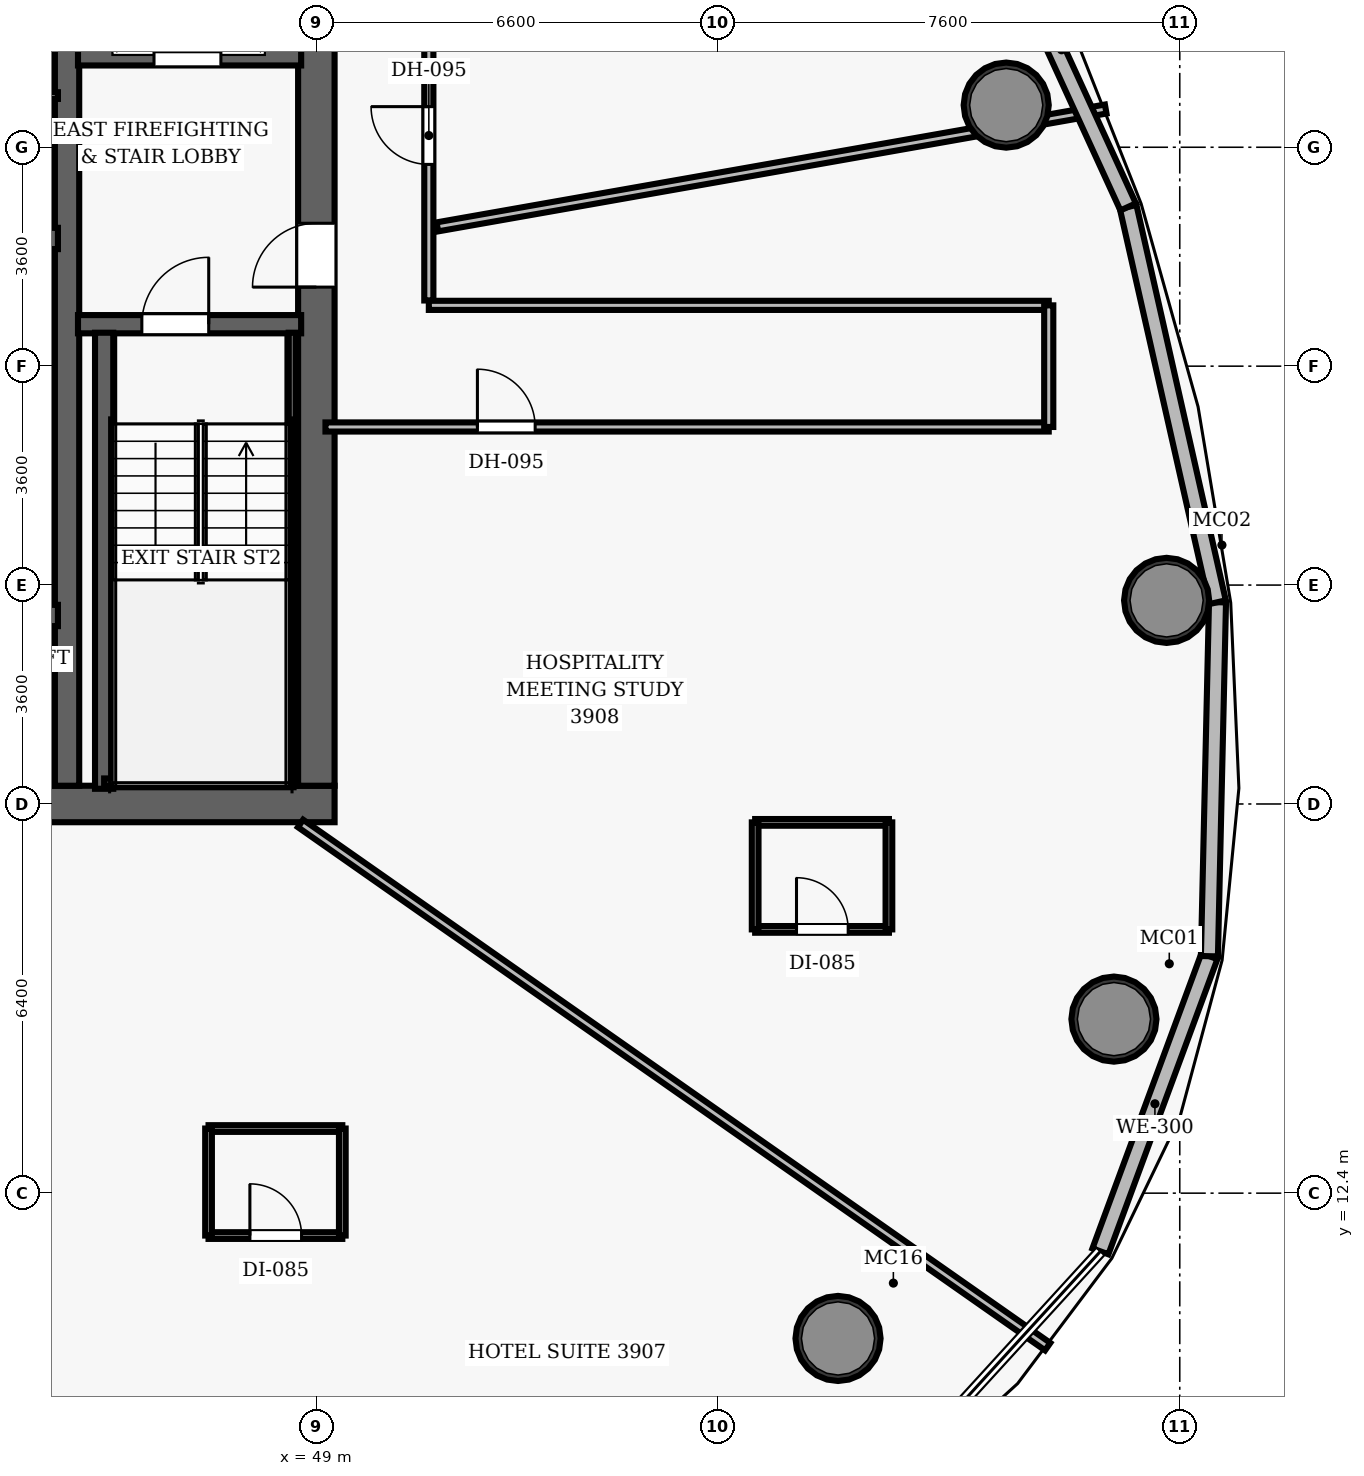
"""IFC4 building model, lengths in metres.
Left out: names, types, materials, properties, quantities, classifications, styles, units other than length and angle.
Written with IfcOpenShell. Run it as: python <this file> out.ifc"""

import sys

from ifc_helpers import new_model, si_unit, direction, frame, frame_2d, origin, origin_2d, place, context, subcontext, project, spatial, rectangle, hollow_circle, extrude, element, fill, save


model = new_model("IFC4")
c1 = context("Model", 3, precision=1e-05, world=origin(), true_north=direction((0.0, 1.0)))
c2 = subcontext(c1, "Body", "Model", "MODEL_VIEW")
j1 = project(units=[si_unit("LENGTHUNIT", "METRE"), si_unit("PLANEANGLEUNIT", "RADIAN")], contexts=[c1])
p1 = place(None, origin())
s1 = spatial("IfcSite", under=j1, at=p1, CompositionType="ELEMENT")
p2 = place(p1, origin())
s2 = spatial("IfcBuilding", under=s1, at=p2, CompositionType="ELEMENT")
p3 = place(p2, frame((0.0, 0.0, 155.3)))
s3 = spatial("IfcBuildingStorey", under=s2, at=p3, CompositionType="ELEMENT", Elevation=155.3)
p4 = place(p3, frame((26.7, 18.8, 0.0), z_axis=(0.0, 0.0, 1.0), x_axis=(1.0, 0.0, 0.0)))
e1 = element("IfcWall", 1, at=p4, inside=s3, PredefinedType="SHEAR", context=c2, shape_type="SweptSolid", body=[
    extrude(rectangle(XDim=22.6, YDim=0.6, at=frame_2d((11.3, 0.0))), origin(), (0.0, 0.0, 1.0), 3.5),
])
p5 = place(p4, frame((14.52, 0.0, 0.0)))
e2 = element("IfcOpeningElement", 2, at=p5, cuts=e1, PredefinedType="OPENING", context=c2, shape_type="SweptSolid", body=[
    extrude(rectangle(XDim=1.05, YDim=2.15, at=frame_2d((0.525, 1.075))), frame((0.0, 0.31, 0.0), z_axis=(0.0, -1.0, 0.0), x_axis=(1.0, 0.0, 0.0)), (0.0, 0.0, 1.0), 0.62),
])
p6 = place(p3, frame((49.0, 19.1, 0.0), z_axis=(0.0, 0.0, 1.0), x_axis=(0.0, 1.0, 0.0)))
e3 = element("IfcWall", 3, at=p6, inside=s3, PredefinedType="SHEAR", context=c2, shape_type="SweptSolid", body=[
    extrude(rectangle(XDim=13.8, YDim=0.6, at=frame_2d((6.9, 0.0))), origin(), (0.0, 0.0, 1.0), 3.5),
])
p7 = place(p6, frame((8.2, 0.0, 0.0)))
e4 = element("IfcOpeningElement", 4, at=p7, cuts=e3, PredefinedType="OPENING", context=c2, shape_type="SweptSolid", body=[
    extrude(rectangle(XDim=1.05, YDim=2.15, at=frame_2d((0.525, 1.075))), frame((0.0, 0.31, 0.0), z_axis=(0.0, -1.0, 0.0), x_axis=(1.0, 0.0, 0.0)), (0.0, 0.0, 1.0), 0.62),
])
p8 = place(p3, frame((44.9, 19.1, 0.0), z_axis=(0.0, 0.0, 1.0), x_axis=(0.0, 1.0, 0.0)))
e5 = element("IfcWall", 5, at=p8, inside=s3, PredefinedType="SHEAR", context=c2, shape_type="SweptSolid", body=[
    extrude(rectangle(XDim=13.8, YDim=0.4, at=frame_2d((6.9, 0.0))), origin(), (0.0, 0.0, 1.0), 3.5),
])
for number, where, z_axis, x_axis in (
    (6, (62.118, 15.262, 0.0), (0.0, 0.0, 1.0), (1.0, 0.0, 0.0)),
    (7, (62.984, 22.148, 0.0), (0.0, 0.0, 1.0), (1.0, 0.0, 0.0)),
    (8, (60.346, 30.293, 0.0), (0.0, 0.0, 1.0), (1.0, 0.0, 0.0)),
    (9, (57.58, 10.011, 0.0), (0.0, 0.0, 1.0), (1.0, 0.0, 0.0)),
):
    element("IfcColumn", number, at=place(p3, frame(where, z_axis=z_axis, x_axis=x_axis)), inside=s3, PredefinedType="COLUMN", context=c2, shape_type="SweptSolid", body=[
        extrude(hollow_circle(Radius=0.7, WallThickness=0.055, at=origin_2d()), origin(), (0.0, 0.0, 1.0), 3.5),
    ])
p9 = place(p3, frame((45.08, 26.69, 0.0), z_axis=(0.0, 0.0, 1.0), x_axis=(1.0, 0.0, 0.0)))
e10 = element("IfcWall", 10, at=p9, inside=s3, PredefinedType="SHEAR", context=c2, shape_type="SweptSolid", body=[
    extrude(rectangle(XDim=3.67, YDim=0.3, at=frame_2d((1.835, 0.0))), origin(), (0.0, 0.0, 1.0), 3.5),
])
p10 = place(p9, frame((1.05, 0.0, 0.0)))
e11 = element("IfcOpeningElement", 11, at=p10, cuts=e10, PredefinedType="OPENING", context=c2, shape_type="SweptSolid", body=[
    extrude(rectangle(XDim=1.1, YDim=2.15, at=frame_2d((0.55, 1.075))), frame((0.0, 0.16, 0.0), z_axis=(0.0, -1.0, 0.0), x_axis=(1.0, 0.0, 0.0)), (0.0, 0.0, 1.0), 0.32),
])
p11 = place(p3, frame((45.51, 19.05, 0.0), z_axis=(0.0, 0.0, 1.0), x_axis=(0.0, 1.0, 0.0)))
e12 = element("IfcWall", 12, at=p11, inside=s3, PredefinedType="SHEAR", context=c2, shape_type="SweptSolid", body=[
    extrude(rectangle(XDim=7.5, YDim=0.3, at=frame_2d((3.75, 0.0))), origin(), (0.0, 0.0, 1.0), 3.5),
])
p12 = place(p3, frame((48.605, 19.1, 0.0), z_axis=(0.0, 0.0, 1.0), x_axis=(0.0, 1.0, 0.0)))
e13 = element("IfcWall", 13, at=p12, inside=s3, PredefinedType="SHEAR", context=c2, shape_type="SweptSolid", body=[
    extrude(rectangle(XDim=7.45, YDim=0.12, at=frame_2d((3.725, 0.0))), origin(), (0.0, 0.0, 1.0), 3.5),
])
p13 = place(p3, frame((45.51, 19.16, 0.0), z_axis=(0.0, 0.0, 1.0), x_axis=(1.0, 0.0, 0.0)))
e14 = element("IfcWall", 14, at=p13, inside=s3, PredefinedType="SHEAR", context=c2, shape_type="SweptSolid", body=[
    extrude(rectangle(XDim=3.095, YDim=0.12, at=frame_2d((1.547, 0.0))), origin(), (0.0, 0.0, 1.0), 3.5),
])
p14 = place(p3, frame((45.08, 31.12, 0.0), z_axis=(0.0, 0.0, 1.0), x_axis=(1.0, 0.0, 0.0)))
e15 = element("IfcWall", 15, at=p14, inside=s3, PredefinedType="SHEAR", context=c2, shape_type="SweptSolid", body=[
    extrude(rectangle(XDim=3.67, YDim=0.35, at=frame_2d((1.835, 0.0))), origin(), (0.0, 0.0, 1.0), 2.675),
])
p15 = place(p14, frame((1.25, 0.0, 0.0)))
e16 = element("IfcOpeningElement", 16, at=p15, cuts=e15, PredefinedType="OPENING", context=c2, shape_type="SweptSolid", body=[
    extrude(rectangle(XDim=1.1, YDim=2.15, at=frame_2d((0.55, 1.075))), frame((0.0, 0.185, 0.0), z_axis=(0.0, -1.0, 0.0), x_axis=(1.0, 0.0, 0.0)), (0.0, 0.0, 1.0), 0.37),
])
for number, where, z_axis, x_axis in (
    (17, (42.72, 21.9, 0.0), (0.0, 0.0, 1.0), (1.0, 0.0, 0.0)),
    (18, (42.72, 28.1, 0.0), (0.0, 0.0, 1.0), (1.0, 0.0, 0.0)),
):
    element("IfcWall", number, at=place(p3, frame(where, z_axis=z_axis, x_axis=x_axis)), inside=s3, PredefinedType="SHEAR", context=c2, shape_type="SweptSolid", body=[
        extrude(rectangle(XDim=2.03, YDim=0.35, at=frame_2d((1.015, 0.0))), origin(), (0.0, 0.0, 1.0), 2.675),
    ])
p16 = place(p3, frame((42.55, 30.45, 0.0), z_axis=(0.0, 0.0, 1.0), x_axis=(1.0, 0.0, 0.0)))
e19 = element("IfcWall", 19, at=p16, inside=s3, PredefinedType="PARTITIONING", context=c2, shape_type="SweptSolid", body=[
    extrude(rectangle(XDim=2.2, YDim=0.11, at=frame_2d((1.1, 0.0))), origin(), (0.0, 0.0, 1.0), 2.675),
])
p17 = place(p3, frame((50.85, 27.08, 0.0), z_axis=(0.0, 0.0, 1.0), x_axis=(0.0, 1.0, 0.0)))
e20 = element("IfcWall", 20, at=p17, inside=s3, PredefinedType="PARTITIONING", context=c2, shape_type="SweptSolid", body=[
    extrude(rectangle(XDim=8.12, YDim=0.15, at=frame_2d((4.06, 0.0))), origin(), (0.0, 0.0, 1.0), 2.675),
])
p18 = place(p17, frame((2.238, 0.0, 0.0)))
e21 = element("IfcOpeningElement", 21, at=p18, cuts=e20, PredefinedType="OPENING", context=c2, shape_type="SweptSolid", body=[
    extrude(rectangle(XDim=0.95, YDim=2.15, at=frame_2d((0.475, 1.075))), frame((0.0, 0.085, 0.0), z_axis=(0.0, -1.0, 0.0), x_axis=(1.0, 0.0, 0.0)), (0.0, 0.0, 1.0), 0.17),
])
p19 = place(p3, frame((50.85, 27.0, 0.0), z_axis=(0.0, 0.0, 1.0), x_axis=(1.0, 0.0, 0.0)))
e22 = element("IfcWall", 22, at=p19, inside=s3, PredefinedType="PARTITIONING", context=c2, shape_type="SweptSolid", body=[
    extrude(rectangle(XDim=10.195, YDim=0.15, at=frame_2d((5.098, 0.0))), origin(), (0.0, 0.0, 1.0), 2.675),
])
p20 = place(p3, frame((49.15, 25.0, 0.0), z_axis=(0.0, 0.0, 1.0), x_axis=(1.0, 0.0, 0.0)))
e23 = element("IfcWall", 23, at=p20, inside=s3, PredefinedType="PARTITIONING", context=c2, shape_type="SweptSolid", body=[
    extrude(rectangle(XDim=11.895, YDim=0.15, at=frame_2d((5.948, 0.0))), origin(), (0.0, 0.0, 1.0), 2.675),
])
p21 = place(p20, frame((2.499, 0.0, 0.0)))
e24 = element("IfcOpeningElement", 24, at=p21, cuts=e23, PredefinedType="OPENING", context=c2, shape_type="SweptSolid", body=[
    extrude(rectangle(XDim=0.95, YDim=2.15, at=frame_2d((0.475, 1.075))), frame((0.0, 0.085, 0.0), z_axis=(0.0, -1.0, 0.0), x_axis=(1.0, 0.0, 0.0)), (0.0, 0.0, 1.0), 0.17),
])
p22 = place(p3, frame((61.045, 25.0, 0.0), z_axis=(0.0, 0.0, 1.0), x_axis=(0.0, 1.0, 0.0)))
e25 = element("IfcWall", 25, at=p22, inside=s3, PredefinedType="PARTITIONING", context=c2, shape_type="SweptSolid", body=[
    extrude(rectangle(XDim=2.0, YDim=0.15, at=frame_2d((1.0, 0.0))), origin(), (0.0, 0.0, 1.0), 2.675),
])
p23 = place(p3, frame((50.99, 28.291, 0.0), z_axis=(0.0, 0.0, 1.0), x_axis=(0.984807550948, 0.173649323627, 0.0)))
e26 = element("IfcWall", 26, at=p23, inside=s3, PredefinedType="PARTITIONING", context=c2, shape_type="SweptSolid", body=[
    extrude(rectangle(XDim=11.162, YDim=0.15, at=frame_2d((5.581, 0.0))), origin(), (0.0, 0.0, 1.0), 2.675),
])
p24 = place(p3, frame((48.74, 18.48, 0.0), z_axis=(0.0, 0.0, 1.0), x_axis=(0.819145510829, -0.573585766986, 0.0)))
e27 = element("IfcWall", 27, at=p24, inside=s3, PredefinedType="PARTITIONING", context=c2, shape_type="SweptSolid", body=[
    extrude(rectangle(XDim=15.001, YDim=0.15, at=frame_2d((7.5, 0.0))), origin(), (0.0, 0.0, 1.0), 2.675),
])
p25 = place(p3, frame((47.227, 11.703, 0.0), z_axis=(0.0, 0.0, 1.0), x_axis=(1.0, 0.0, 0.0)))
e28 = element("IfcWall", 28, at=p25, inside=s3, PredefinedType="PARTITIONING", context=c2, shape_type="SweptSolid", body=[
    extrude(rectangle(XDim=2.2, YDim=0.11, at=frame_2d((1.1, 0.0))), origin(), (0.0, 0.0, 1.0), 2.675),
])
p26 = place(p25, frame((0.68, 0.0, 0.0)))
e29 = element("IfcOpeningElement", 29, at=p26, cuts=e28, PredefinedType="OPENING", context=c2, shape_type="SweptSolid", body=[
    extrude(rectangle(XDim=0.85, YDim=2.1, at=frame_2d((0.425, 1.05))), frame((0.0, 0.065, 0.0), z_axis=(0.0, -1.0, 0.0), x_axis=(1.0, 0.0, 0.0)), (0.0, 0.0, 1.0), 0.13),
])
p27 = place(p3, frame((47.227, 13.463, 0.0), z_axis=(0.0, 0.0, 1.0), x_axis=(1.0, 0.0, 0.0)))
e30 = element("IfcWall", 30, at=p27, inside=s3, PredefinedType="PARTITIONING", context=c2, shape_type="SweptSolid", body=[
    extrude(rectangle(XDim=2.2, YDim=0.11, at=frame_2d((1.1, 0.0))), origin(), (0.0, 0.0, 1.0), 2.675),
])
for number, where, z_axis, x_axis in (
    (31, (47.227, 11.703, 0.0), (0.0, 0.0, 1.0), (0.0, 1.0, 0.0)),
    (32, (49.427, 11.703, 0.0), (0.0, 0.0, 1.0), (0.0, 1.0, 0.0)),
):
    element("IfcWall", number, at=place(p3, frame(where, z_axis=z_axis, x_axis=x_axis)), inside=s3, PredefinedType="PARTITIONING", context=c2, shape_type="SweptSolid", body=[
        extrude(rectangle(XDim=1.76, YDim=0.11, at=frame_2d((0.88, 0.0))), origin(), (0.0, 0.0, 1.0), 2.675),
    ])
p28 = place(p3, frame((56.217, 16.738, 0.0), z_axis=(0.0, 0.0, 1.0), x_axis=(1.0, 0.0, 0.0)))
e33 = element("IfcWall", 33, at=p28, inside=s3, PredefinedType="PARTITIONING", context=c2, shape_type="SweptSolid", body=[
    extrude(rectangle(XDim=2.2, YDim=0.11, at=frame_2d((1.1, 0.0))), origin(), (0.0, 0.0, 1.0), 2.675),
])
p29 = place(p28, frame((0.68, 0.0, 0.0)))
e34 = element("IfcOpeningElement", 34, at=p29, cuts=e33, PredefinedType="OPENING", context=c2, shape_type="SweptSolid", body=[
    extrude(rectangle(XDim=0.85, YDim=2.1, at=frame_2d((0.425, 1.05))), frame((0.0, 0.065, 0.0), z_axis=(0.0, -1.0, 0.0), x_axis=(1.0, 0.0, 0.0)), (0.0, 0.0, 1.0), 0.13),
])
p30 = place(p3, frame((56.217, 18.498, 0.0), z_axis=(0.0, 0.0, 1.0), x_axis=(1.0, 0.0, 0.0)))
e35 = element("IfcWall", 35, at=p30, inside=s3, PredefinedType="PARTITIONING", context=c2, shape_type="SweptSolid", body=[
    extrude(rectangle(XDim=2.2, YDim=0.11, at=frame_2d((1.1, 0.0))), origin(), (0.0, 0.0, 1.0), 2.675),
])
for number, where, z_axis, x_axis in (
    (36, (56.217, 16.738, 0.0), (0.0, 0.0, 1.0), (0.0, 1.0, 0.0)),
    (37, (58.417, 16.738, 0.0), (0.0, 0.0, 1.0), (0.0, 1.0, 0.0)),
):
    element("IfcWall", number, at=place(p3, frame(where, z_axis=z_axis, x_axis=x_axis)), inside=s3, PredefinedType="PARTITIONING", context=c2, shape_type="SweptSolid", body=[
        extrude(rectangle(XDim=1.76, YDim=0.11, at=frame_2d((0.88, 0.0))), origin(), (0.0, 0.0, 1.0), 2.675),
    ])
p31 = place(p3, frame((63.688, 16.297, 0.0), z_axis=(0.0, 0.0, 1.0), x_axis=(-0.346470541845, -0.938060852842, 0.0)))
e38 = element("IfcWall", 38, at=p31, inside=s3, PredefinedType="SOLIDWALL", context=c2, shape_type="SweptSolid", body=[
    extrude(rectangle(XDim=5.174, YDim=0.28, at=frame_2d((2.587, 0.0))), origin(), (0.0, 0.0, 1.0), 3.26),
])
p32 = place(p3, frame((63.821, 22.118, 0.0), z_axis=(0.0, 0.0, 1.0), x_axis=(-0.022850934885, -0.999738883296, 0.0)))
e39 = element("IfcWall", 39, at=p32, inside=s3, PredefinedType="SOLIDWALL", context=c2, shape_type="SweptSolid", body=[
    extrude(rectangle(XDim=5.823, YDim=0.28, at=frame_2d((2.911, 0.0))), origin(), (0.0, 0.0, 1.0), 3.26),
])
p33 = place(p3, frame((62.351, 28.619, 0.0), z_axis=(0.0, 0.0, 1.0), x_axis=(0.220477855256, -0.975391980355, 0.0)))
e40 = element("IfcWall", 40, at=p33, inside=s3, PredefinedType="SOLIDWALL", context=c2, shape_type="SweptSolid", body=[
    extrude(rectangle(XDim=6.665, YDim=0.28, at=frame_2d((3.333, 0.0))), origin(), (0.0, 0.0, 1.0), 3.26),
])
p34 = place(p3, frame((59.313, 35.248, 0.0), z_axis=(0.0, 0.0, 1.0), x_axis=(0.416676615021, -0.909054783, 0.0)))
e41 = element("IfcWall", 41, at=p34, inside=s3, PredefinedType="SOLIDWALL", context=c2, shape_type="SweptSolid", body=[
    extrude(rectangle(XDim=7.292, YDim=0.28, at=frame_2d((3.646, 0.0))), origin(), (0.0, 0.0, 1.0), 3.26),
])
p35 = place(p10, origin())
e42 = element("IfcDoor", 42, at=p35, inside=s3, OperationType="SINGLE_SWING_RIGHT", PredefinedType="DOOR", context=c2, shape_type="SweptSolid", body=[
    extrude(rectangle(XDim=1.1, YDim=2.15, at=frame_2d((0.55, 1.075))), frame((0.0, 0.025, 0.0), z_axis=(0.0, -1.0, 0.0), x_axis=(1.0, 0.0, 0.0)), (0.0, 0.0, 1.0), 0.05),
])
fill(e11, e42)
p36 = place(p7, origin())
e43 = element("IfcDoor", 43, at=p36, inside=s3, OperationType="SINGLE_SWING_LEFT", PredefinedType="DOOR", context=c2, shape_type="SweptSolid", body=[
    extrude(rectangle(XDim=1.05, YDim=2.15, at=frame_2d((0.525, 1.075))), frame((0.0, 0.025, 0.0), z_axis=(0.0, -1.0, 0.0), x_axis=(1.0, 0.0, 0.0)), (0.0, 0.0, 1.0), 0.05),
])
fill(e4, e43)
p37 = place(p18, origin())
e44 = element("IfcDoor", 44, at=p37, inside=s3, OperationType="SINGLE_SWING_RIGHT", PredefinedType="DOOR", context=c2, shape_type="SweptSolid", body=[
    extrude(rectangle(XDim=0.95, YDim=2.15, at=frame_2d((0.475, 1.075))), frame((0.0, 0.025, 0.0), z_axis=(0.0, -1.0, 0.0), x_axis=(1.0, 0.0, 0.0)), (0.0, 0.0, 1.0), 0.05),
])
fill(e21, e44)
p38 = place(p26, origin())
e45 = element("IfcDoor", 45, at=p38, inside=s3, OperationType="SINGLE_SWING_LEFT", PredefinedType="DOOR", context=c2, shape_type="SweptSolid", body=[
    extrude(rectangle(XDim=0.85, YDim=2.1, at=frame_2d((0.425, 1.05))), frame((0.0, 0.025, 0.0), z_axis=(0.0, -1.0, 0.0), x_axis=(1.0, 0.0, 0.0)), (0.0, 0.0, 1.0), 0.05),
])
fill(e29, e45)
p39 = place(p21, origin())
e46 = element("IfcDoor", 46, at=p39, inside=s3, OperationType="SINGLE_SWING_LEFT", PredefinedType="DOOR", context=c2, shape_type="SweptSolid", body=[
    extrude(rectangle(XDim=0.95, YDim=2.15, at=frame_2d((0.475, 1.075))), frame((0.0, 0.025, 0.0), z_axis=(0.0, -1.0, 0.0), x_axis=(1.0, 0.0, 0.0)), (0.0, 0.0, 1.0), 0.05),
])
fill(e24, e46)
p40 = place(p29, origin())
e47 = element("IfcDoor", 47, at=p40, inside=s3, OperationType="SINGLE_SWING_LEFT", PredefinedType="DOOR", context=c2, shape_type="SweptSolid", body=[
    extrude(rectangle(XDim=0.85, YDim=2.1, at=frame_2d((0.425, 1.05))), frame((0.0, 0.025, 0.0), z_axis=(0.0, -1.0, 0.0), x_axis=(1.0, 0.0, 0.0)), (0.0, 0.0, 1.0), 0.05),
])
fill(e34, e47)
p41 = place(p15, origin())
e48 = element("IfcDoor", 48, at=p41, inside=s3, OperationType="SLIDING_TO_LEFT", PredefinedType="DOOR", context=c2, shape_type="SweptSolid", body=[
    extrude(rectangle(XDim=1.1, YDim=2.15, at=frame_2d((0.55, 1.075))), frame((0.0, 0.025, 0.0), z_axis=(0.0, -1.0, 0.0), x_axis=(1.0, 0.0, 0.0)), (0.0, 0.0, 1.0), 0.05),
])
fill(e16, e48)
save(model, sys.argv[1])
